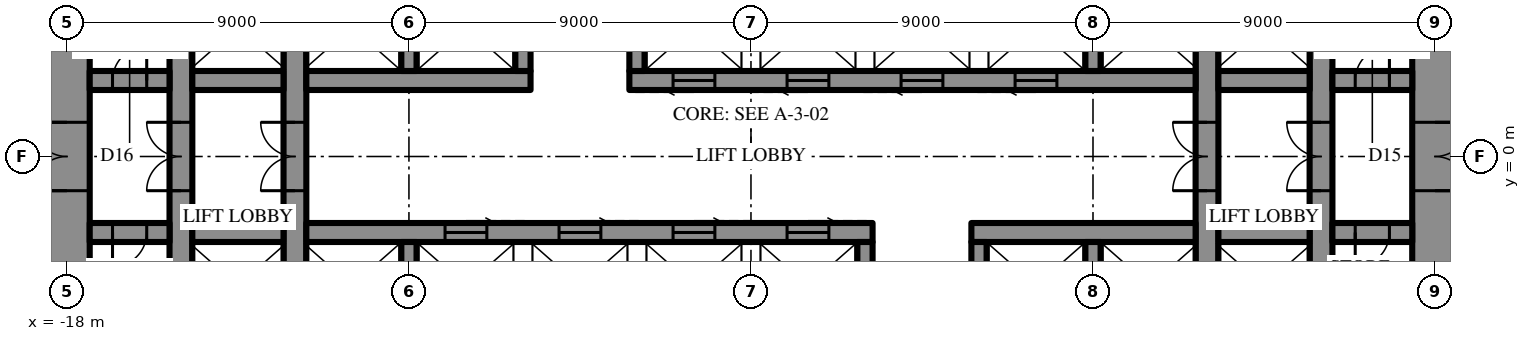
"""IFC4 building model, lengths in metres.
Left out: names, types, materials, properties, quantities, classifications, styles, units other than length and angle.
Written with IfcOpenShell. Run it as: python <this file> out.ifc"""

import sys

from ifc_helpers import new_model, si_unit, direction, frame, frame_2d, origin, place, context, subcontext, project, spatial, rectangle, extrude, element, fill, save


model = new_model("IFC4")
c1 = context("Model", 3, precision=1e-05, world=origin(), true_north=direction((0.0, 1.0)))
c2 = subcontext(c1, "Body", "Model", "MODEL_VIEW")
j1 = project(units=[si_unit("LENGTHUNIT", "METRE"), si_unit("PLANEANGLEUNIT", "RADIAN")], contexts=[c1])
p1 = place(None, origin())
s1 = spatial("IfcSite", under=j1, at=p1, CompositionType="ELEMENT")
p2 = place(p1, origin())
s2 = spatial("IfcBuilding", under=s1, at=p2, CompositionType="ELEMENT")
p3 = place(p2, frame((0.0, 0.0, 178.3)))
s3 = spatial("IfcBuildingStorey", under=s2, at=p3, CompositionType="ELEMENT", Elevation=178.3)
p4 = place(p3, frame((18.0, -10.7, 0.0), z_axis=(0.0, 0.0, 1.0), x_axis=(0.0, 1.0, 0.0)))
e1 = element("IfcWall", 1, at=p4, inside=s3, PredefinedType="SHEAR", context=c2, shape_type="SweptSolid", body=[
    extrude(rectangle(XDim=21.4, YDim=1.2, at=frame_2d((10.7, 0.0))), origin(), (0.0, 0.0, 1.0), 4.2),
])
p5 = place(p4, frame((9.8, 0.0, 0.0)))
e2 = element("IfcOpeningElement", 2, at=p5, cuts=e1, PredefinedType="OPENING", context=c2, shape_type="SweptSolid", body=[
    extrude(rectangle(XDim=1.8, YDim=2.4, at=frame_2d((0.9, 1.2))), frame((0.0, 0.61, 0.0), z_axis=(0.0, -1.0, 0.0), x_axis=(1.0, 0.0, 0.0)), (0.0, 0.0, 1.0), 1.22),
])
p6 = place(p3, frame((-18.0, 10.7, 0.0), z_axis=(0.0, 0.0, 1.0), x_axis=(0.0, -1.0, 0.0)))
e3 = element("IfcWall", 3, at=p6, inside=s3, PredefinedType="SHEAR", context=c2, shape_type="SweptSolid", body=[
    extrude(rectangle(XDim=21.4, YDim=1.2, at=frame_2d((10.7, 0.0))), origin(), (0.0, 0.0, 1.0), 4.2),
])
p7 = place(p6, frame((9.8, 0.0, 0.0)))
e4 = element("IfcOpeningElement", 4, at=p7, cuts=e3, PredefinedType="OPENING", context=c2, shape_type="SweptSolid", body=[
    extrude(rectangle(XDim=1.8, YDim=2.4, at=frame_2d((0.9, 1.2))), frame((0.0, 0.61, 0.0), z_axis=(0.0, -1.0, 0.0), x_axis=(1.0, 0.0, 0.0)), (0.0, 0.0, 1.0), 1.22),
])
p8 = place(p3, frame((12.0, -10.7, 0.0), z_axis=(0.0, 0.0, 1.0), x_axis=(0.0, 1.0, 0.0)))
e5 = element("IfcWall", 5, at=p8, inside=s3, PredefinedType="SHEAR", context=c2, shape_type="SweptSolid", body=[
    extrude(rectangle(XDim=21.4, YDim=0.6, at=frame_2d((10.7, 0.0))), origin(), (0.0, 0.0, 1.0), 4.2),
])
p9 = place(p8, frame((9.8, 0.0, 0.0)))
e6 = element("IfcOpeningElement", 6, at=p9, cuts=e5, PredefinedType="OPENING", context=c2, shape_type="SweptSolid", body=[
    extrude(rectangle(XDim=1.8, YDim=2.4, at=frame_2d((0.9, 1.2))), frame((0.0, 0.31, 0.0), z_axis=(0.0, -1.0, 0.0), x_axis=(1.0, 0.0, 0.0)), (0.0, 0.0, 1.0), 0.62),
])
p10 = place(p3, frame((-12.0, -10.7, 0.0), z_axis=(0.0, 0.0, 1.0), x_axis=(0.0, 1.0, 0.0)))
e7 = element("IfcWall", 7, at=p10, inside=s3, PredefinedType="SHEAR", context=c2, shape_type="SweptSolid", body=[
    extrude(rectangle(XDim=21.4, YDim=0.6, at=frame_2d((10.7, 0.0))), origin(), (0.0, 0.0, 1.0), 4.2),
])
p11 = place(p10, frame((9.8, 0.0, 0.0)))
e8 = element("IfcOpeningElement", 8, at=p11, cuts=e7, PredefinedType="OPENING", context=c2, shape_type="SweptSolid", body=[
    extrude(rectangle(XDim=1.8, YDim=2.4, at=frame_2d((0.9, 1.2))), frame((0.0, 0.31, 0.0), z_axis=(0.0, -1.0, 0.0), x_axis=(1.0, 0.0, 0.0)), (0.0, 0.0, 1.0), 0.62),
])
p12 = place(p3, frame((15.0, -10.7, 0.0), z_axis=(0.0, 0.0, 1.0), x_axis=(0.0, 1.0, 0.0)))
e9 = element("IfcWall", 9, at=p12, inside=s3, PredefinedType="SHEAR", context=c2, shape_type="SweptSolid", body=[
    extrude(rectangle(XDim=21.4, YDim=0.6, at=frame_2d((10.7, 0.0))), origin(), (0.0, 0.0, 1.0), 4.2),
])
p13 = place(p12, frame((9.8, 0.0, 0.0)))
e10 = element("IfcOpeningElement", 10, at=p13, cuts=e9, PredefinedType="OPENING", context=c2, shape_type="SweptSolid", body=[
    extrude(rectangle(XDim=1.8, YDim=2.4, at=frame_2d((0.9, 1.2))), frame((0.0, 0.31, 0.0), z_axis=(0.0, -1.0, 0.0), x_axis=(1.0, 0.0, 0.0)), (0.0, 0.0, 1.0), 0.62),
])
p14 = place(p3, frame((-15.0, -10.7, 0.0), z_axis=(0.0, 0.0, 1.0), x_axis=(0.0, 1.0, 0.0)))
e11 = element("IfcWall", 11, at=p14, inside=s3, PredefinedType="SHEAR", context=c2, shape_type="SweptSolid", body=[
    extrude(rectangle(XDim=21.4, YDim=0.6, at=frame_2d((10.7, 0.0))), origin(), (0.0, 0.0, 1.0), 4.2),
])
p15 = place(p14, frame((9.8, 0.0, 0.0)))
e12 = element("IfcOpeningElement", 12, at=p15, cuts=e11, PredefinedType="OPENING", context=c2, shape_type="SweptSolid", body=[
    extrude(rectangle(XDim=1.8, YDim=2.4, at=frame_2d((0.9, 1.2))), frame((0.0, 0.31, 0.0), z_axis=(0.0, -1.0, 0.0), x_axis=(1.0, 0.0, 0.0)), (0.0, 0.0, 1.0), 0.62),
])
p16 = place(p3, frame((-17.4, 2.0, 0.0), z_axis=(0.0, 0.0, 1.0), x_axis=(1.0, 0.0, 0.0)))
e13 = element("IfcWall", 13, at=p16, inside=s3, PredefinedType="SHEAR", context=c2, shape_type="SweptSolid", body=[
    extrude(rectangle(XDim=2.1, YDim=0.5, at=frame_2d((1.05, 0.0))), origin(), (0.0, 0.0, 1.0), 4.2),
])
p17 = place(p16, frame((0.6, 0.0, 0.0)))
e14 = element("IfcOpeningElement", 14, at=p17, cuts=e13, PredefinedType="OPENING", context=c2, shape_type="SweptSolid", body=[
    extrude(rectangle(XDim=0.9, YDim=2.2, at=frame_2d((0.45, 1.1))), frame((0.0, 0.26, 0.0), z_axis=(0.0, -1.0, 0.0), x_axis=(1.0, 0.0, 0.0)), (0.0, 0.0, 1.0), 0.52),
])
p18 = place(p3, frame((-14.7, 2.0, 0.0), z_axis=(0.0, 0.0, 1.0), x_axis=(1.0, 0.0, 0.0)))
e15 = element("IfcWall", 15, at=p18, inside=s3, PredefinedType="SHEAR", context=c2, shape_type="SweptSolid", body=[
    extrude(rectangle(XDim=2.4, YDim=0.5, at=frame_2d((1.2, 0.0))), origin(), (0.0, 0.0, 1.0), 4.2),
])
p19 = place(p3, frame((-11.7, 2.0, 0.0), z_axis=(0.0, 0.0, 1.0), x_axis=(1.0, 0.0, 0.0)))
e16 = element("IfcWall", 16, at=p19, inside=s3, PredefinedType="SHEAR", context=c2, shape_type="SweptSolid", body=[
    extrude(rectangle(XDim=5.9, YDim=0.5, at=frame_2d((2.95, 0.0))), origin(), (0.0, 0.0, 1.0), 4.2),
])
p20 = place(p3, frame((-3.2, 2.0, 0.0), z_axis=(0.0, 0.0, 1.0), x_axis=(1.0, 0.0, 0.0)))
e17 = element("IfcWall", 17, at=p20, inside=s3, PredefinedType="SHEAR", context=c2, shape_type="SweptSolid", body=[
    extrude(rectangle(XDim=14.9, YDim=0.5, at=frame_2d((7.45, 0.0))), origin(), (0.0, 0.0, 1.0), 4.2),
])
p21 = place(p20, frame((1.15, 0.0, 0.0)))
e18 = element("IfcOpeningElement", 18, at=p21, cuts=e17, PredefinedType="OPENING", context=c2, shape_type="SweptSolid", body=[
    extrude(rectangle(XDim=1.1, YDim=2.2, at=frame_2d((0.55, 1.1))), frame((0.0, 0.26, 0.0), z_axis=(0.0, -1.0, 0.0), x_axis=(1.0, 0.0, 0.0)), (0.0, 0.0, 1.0), 0.52),
])
p22 = place(p20, frame((4.15, 0.0, 0.0)))
e19 = element("IfcOpeningElement", 19, at=p22, cuts=e17, PredefinedType="OPENING", context=c2, shape_type="SweptSolid", body=[
    extrude(rectangle(XDim=1.1, YDim=2.2, at=frame_2d((0.55, 1.1))), frame((0.0, 0.26, 0.0), z_axis=(0.0, -1.0, 0.0), x_axis=(1.0, 0.0, 0.0)), (0.0, 0.0, 1.0), 0.52),
])
p23 = place(p20, frame((7.15, 0.0, 0.0)))
e20 = element("IfcOpeningElement", 20, at=p23, cuts=e17, PredefinedType="OPENING", context=c2, shape_type="SweptSolid", body=[
    extrude(rectangle(XDim=1.1, YDim=2.2, at=frame_2d((0.55, 1.1))), frame((0.0, 0.26, 0.0), z_axis=(0.0, -1.0, 0.0), x_axis=(1.0, 0.0, 0.0)), (0.0, 0.0, 1.0), 0.52),
])
p24 = place(p20, frame((10.15, 0.0, 0.0)))
e21 = element("IfcOpeningElement", 21, at=p24, cuts=e17, PredefinedType="OPENING", context=c2, shape_type="SweptSolid", body=[
    extrude(rectangle(XDim=1.1, YDim=2.2, at=frame_2d((0.55, 1.1))), frame((0.0, 0.26, 0.0), z_axis=(0.0, -1.0, 0.0), x_axis=(1.0, 0.0, 0.0)), (0.0, 0.0, 1.0), 0.52),
])
p25 = place(p3, frame((12.3, 2.0, 0.0), z_axis=(0.0, 0.0, 1.0), x_axis=(1.0, 0.0, 0.0)))
e22 = element("IfcWall", 22, at=p25, inside=s3, PredefinedType="SHEAR", context=c2, shape_type="SweptSolid", body=[
    extrude(rectangle(XDim=2.4, YDim=0.5, at=frame_2d((1.2, 0.0))), origin(), (0.0, 0.0, 1.0), 4.2),
])
p26 = place(p3, frame((15.3, 2.0, 0.0), z_axis=(0.0, 0.0, 1.0), x_axis=(1.0, 0.0, 0.0)))
e23 = element("IfcWall", 23, at=p26, inside=s3, PredefinedType="SHEAR", context=c2, shape_type="SweptSolid", body=[
    extrude(rectangle(XDim=2.1, YDim=0.5, at=frame_2d((1.05, 0.0))), origin(), (0.0, 0.0, 1.0), 4.2),
])
p27 = place(p26, frame((0.6, 0.0, 0.0)))
e24 = element("IfcOpeningElement", 24, at=p27, cuts=e23, PredefinedType="OPENING", context=c2, shape_type="SweptSolid", body=[
    extrude(rectangle(XDim=0.9, YDim=2.2, at=frame_2d((0.45, 1.1))), frame((0.0, 0.26, 0.0), z_axis=(0.0, -1.0, 0.0), x_axis=(1.0, 0.0, 0.0)), (0.0, 0.0, 1.0), 0.52),
])
for number, where, z_axis, x_axis in (
    (25, (-9.0, 2.25, 0.0), (0.0, 0.0, 1.0), (0.0, 1.0, 0.0)),
    (26, (-6.0, 2.25, 0.0), (0.0, 0.0, 1.0), (0.0, 1.0, 0.0)),
    (27, (-3.0, 2.25, 0.0), (0.0, 0.0, 1.0), (0.0, 1.0, 0.0)),
    (28, (9.0, 2.25, 0.0), (0.0, 0.0, 1.0), (0.0, 1.0, 0.0)),
):
    element("IfcWall", number, at=place(p3, frame(where, z_axis=z_axis, x_axis=x_axis)), inside=s3, PredefinedType="SHEAR", context=c2, shape_type="SweptSolid", body=[
        extrude(rectangle(XDim=2.3, YDim=0.4, at=frame_2d((1.15, 0.0))), origin(), (0.0, 0.0, 1.0), 4.2),
    ])
p28 = place(p3, frame((17.4, -2.0, 0.0), z_axis=(0.0, 0.0, 1.0), x_axis=(-1.0, 0.0, 0.0)))
e29 = element("IfcWall", 29, at=p28, inside=s3, PredefinedType="SHEAR", context=c2, shape_type="SweptSolid", body=[
    extrude(rectangle(XDim=2.1, YDim=0.5, at=frame_2d((1.05, 0.0))), origin(), (0.0, 0.0, 1.0), 4.2),
])
p29 = place(p28, frame((0.6, 0.0, 0.0)))
e30 = element("IfcOpeningElement", 30, at=p29, cuts=e29, PredefinedType="OPENING", context=c2, shape_type="SweptSolid", body=[
    extrude(rectangle(XDim=0.9, YDim=2.2, at=frame_2d((0.45, 1.1))), frame((0.0, 0.26, 0.0), z_axis=(0.0, -1.0, 0.0), x_axis=(1.0, 0.0, 0.0)), (0.0, 0.0, 1.0), 0.52),
])
p30 = place(p3, frame((14.7, -2.0, 0.0), z_axis=(0.0, 0.0, 1.0), x_axis=(-1.0, 0.0, 0.0)))
e31 = element("IfcWall", 31, at=p30, inside=s3, PredefinedType="SHEAR", context=c2, shape_type="SweptSolid", body=[
    extrude(rectangle(XDim=2.4, YDim=0.5, at=frame_2d((1.2, 0.0))), origin(), (0.0, 0.0, 1.0), 4.2),
])
p31 = place(p3, frame((11.7, -2.0, 0.0), z_axis=(0.0, 0.0, 1.0), x_axis=(-1.0, 0.0, 0.0)))
e32 = element("IfcWall", 32, at=p31, inside=s3, PredefinedType="SHEAR", context=c2, shape_type="SweptSolid", body=[
    extrude(rectangle(XDim=5.9, YDim=0.5, at=frame_2d((2.95, 0.0))), origin(), (0.0, 0.0, 1.0), 4.2),
])
p32 = place(p3, frame((3.2, -2.0, 0.0), z_axis=(0.0, 0.0, 1.0), x_axis=(-1.0, 0.0, 0.0)))
e33 = element("IfcWall", 33, at=p32, inside=s3, PredefinedType="SHEAR", context=c2, shape_type="SweptSolid", body=[
    extrude(rectangle(XDim=14.9, YDim=0.5, at=frame_2d((7.45, 0.0))), origin(), (0.0, 0.0, 1.0), 4.2),
])
p33 = place(p32, frame((1.15, 0.0, 0.0)))
e34 = element("IfcOpeningElement", 34, at=p33, cuts=e33, PredefinedType="OPENING", context=c2, shape_type="SweptSolid", body=[
    extrude(rectangle(XDim=1.1, YDim=2.2, at=frame_2d((0.55, 1.1))), frame((0.0, 0.26, 0.0), z_axis=(0.0, -1.0, 0.0), x_axis=(1.0, 0.0, 0.0)), (0.0, 0.0, 1.0), 0.52),
])
p34 = place(p32, frame((4.15, 0.0, 0.0)))
e35 = element("IfcOpeningElement", 35, at=p34, cuts=e33, PredefinedType="OPENING", context=c2, shape_type="SweptSolid", body=[
    extrude(rectangle(XDim=1.1, YDim=2.2, at=frame_2d((0.55, 1.1))), frame((0.0, 0.26, 0.0), z_axis=(0.0, -1.0, 0.0), x_axis=(1.0, 0.0, 0.0)), (0.0, 0.0, 1.0), 0.52),
])
p35 = place(p32, frame((7.15, 0.0, 0.0)))
e36 = element("IfcOpeningElement", 36, at=p35, cuts=e33, PredefinedType="OPENING", context=c2, shape_type="SweptSolid", body=[
    extrude(rectangle(XDim=1.1, YDim=2.2, at=frame_2d((0.55, 1.1))), frame((0.0, 0.26, 0.0), z_axis=(0.0, -1.0, 0.0), x_axis=(1.0, 0.0, 0.0)), (0.0, 0.0, 1.0), 0.52),
])
p36 = place(p32, frame((10.15, 0.0, 0.0)))
e37 = element("IfcOpeningElement", 37, at=p36, cuts=e33, PredefinedType="OPENING", context=c2, shape_type="SweptSolid", body=[
    extrude(rectangle(XDim=1.1, YDim=2.2, at=frame_2d((0.55, 1.1))), frame((0.0, 0.26, 0.0), z_axis=(0.0, -1.0, 0.0), x_axis=(1.0, 0.0, 0.0)), (0.0, 0.0, 1.0), 0.52),
])
p37 = place(p3, frame((-12.3, -2.0, 0.0), z_axis=(0.0, 0.0, 1.0), x_axis=(-1.0, 0.0, 0.0)))
e38 = element("IfcWall", 38, at=p37, inside=s3, PredefinedType="SHEAR", context=c2, shape_type="SweptSolid", body=[
    extrude(rectangle(XDim=2.4, YDim=0.5, at=frame_2d((1.2, 0.0))), origin(), (0.0, 0.0, 1.0), 4.2),
])
p38 = place(p3, frame((-15.3, -2.0, 0.0), z_axis=(0.0, 0.0, 1.0), x_axis=(-1.0, 0.0, 0.0)))
e39 = element("IfcWall", 39, at=p38, inside=s3, PredefinedType="SHEAR", context=c2, shape_type="SweptSolid", body=[
    extrude(rectangle(XDim=2.1, YDim=0.5, at=frame_2d((1.05, 0.0))), origin(), (0.0, 0.0, 1.0), 4.2),
])
p39 = place(p38, frame((0.6, 0.0, 0.0)))
e40 = element("IfcOpeningElement", 40, at=p39, cuts=e39, PredefinedType="OPENING", context=c2, shape_type="SweptSolid", body=[
    extrude(rectangle(XDim=0.9, YDim=2.2, at=frame_2d((0.45, 1.1))), frame((0.0, 0.26, 0.0), z_axis=(0.0, -1.0, 0.0), x_axis=(1.0, 0.0, 0.0)), (0.0, 0.0, 1.0), 0.52),
])
for number, where, z_axis, x_axis in (
    (41, (9.0, -2.25, 0.0), (0.0, 0.0, 1.0), (0.0, -1.0, 0.0)),
    (42, (6.0, -2.25, 0.0), (0.0, 0.0, 1.0), (0.0, -1.0, 0.0)),
    (43, (3.0, -2.25, 0.0), (0.0, 0.0, 1.0), (0.0, -1.0, 0.0)),
    (44, (-9.0, -2.25, 0.0), (0.0, 0.0, 1.0), (0.0, -1.0, 0.0)),
):
    element("IfcWall", number, at=place(p3, frame(where, z_axis=z_axis, x_axis=x_axis)), inside=s3, PredefinedType="SHEAR", context=c2, shape_type="SweptSolid", body=[
        extrude(rectangle(XDim=2.3, YDim=0.4, at=frame_2d((1.15, 0.0))), origin(), (0.0, 0.0, 1.0), 4.2),
    ])
p40 = place(p5, frame((1.8, 0.0, 0.0), z_axis=(0.0, 0.0, 1.0), x_axis=(-1.0, 0.0, 0.0)))
e45 = element("IfcDoor", 45, at=p40, inside=s3, OperationType="DOUBLE_DOOR_SINGLE_SWING", PredefinedType="DOOR", context=c2, shape_type="SweptSolid", body=[
    extrude(rectangle(XDim=1.8, YDim=2.4, at=frame_2d((0.9, 1.2))), frame((0.0, 0.025, 0.0), z_axis=(0.0, -1.0, 0.0), x_axis=(1.0, 0.0, 0.0)), (0.0, 0.0, 1.0), 0.05),
])
fill(e2, e45)
p41 = place(p7, frame((1.8, 0.0, 0.0), z_axis=(0.0, 0.0, 1.0), x_axis=(-1.0, 0.0, 0.0)))
e46 = element("IfcDoor", 46, at=p41, inside=s3, OperationType="DOUBLE_DOOR_SINGLE_SWING", PredefinedType="DOOR", context=c2, shape_type="SweptSolid", body=[
    extrude(rectangle(XDim=1.8, YDim=2.4, at=frame_2d((0.9, 1.2))), frame((0.0, 0.025, 0.0), z_axis=(0.0, -1.0, 0.0), x_axis=(1.0, 0.0, 0.0)), (0.0, 0.0, 1.0), 0.05),
])
fill(e4, e46)
p42 = place(p17, origin())
e47 = element("IfcDoor", 47, at=p42, inside=s3, OperationType="SINGLE_SWING_LEFT", PredefinedType="DOOR", context=c2, shape_type="SweptSolid", body=[
    extrude(rectangle(XDim=0.9, YDim=2.2, at=frame_2d((0.45, 1.1))), frame((0.0, 0.025, 0.0), z_axis=(0.0, -1.0, 0.0), x_axis=(1.0, 0.0, 0.0)), (0.0, 0.0, 1.0), 0.05),
])
fill(e14, e47)
p43 = place(p27, origin())
e48 = element("IfcDoor", 48, at=p43, inside=s3, OperationType="SINGLE_SWING_LEFT", PredefinedType="DOOR", context=c2, shape_type="SweptSolid", body=[
    extrude(rectangle(XDim=0.9, YDim=2.2, at=frame_2d((0.45, 1.1))), frame((0.0, 0.025, 0.0), z_axis=(0.0, -1.0, 0.0), x_axis=(1.0, 0.0, 0.0)), (0.0, 0.0, 1.0), 0.05),
])
fill(e24, e48)
p44 = place(p29, origin())
e49 = element("IfcDoor", 49, at=p44, inside=s3, OperationType="SINGLE_SWING_LEFT", PredefinedType="DOOR", context=c2, shape_type="SweptSolid", body=[
    extrude(rectangle(XDim=0.9, YDim=2.2, at=frame_2d((0.45, 1.1))), frame((0.0, 0.025, 0.0), z_axis=(0.0, -1.0, 0.0), x_axis=(1.0, 0.0, 0.0)), (0.0, 0.0, 1.0), 0.05),
])
fill(e30, e49)
p45 = place(p39, origin())
e50 = element("IfcDoor", 50, at=p45, inside=s3, OperationType="SINGLE_SWING_LEFT", PredefinedType="DOOR", context=c2, shape_type="SweptSolid", body=[
    extrude(rectangle(XDim=0.9, YDim=2.2, at=frame_2d((0.45, 1.1))), frame((0.0, 0.025, 0.0), z_axis=(0.0, -1.0, 0.0), x_axis=(1.0, 0.0, 0.0)), (0.0, 0.0, 1.0), 0.05),
])
fill(e40, e50)
p46 = place(p9, origin())
e51 = element("IfcDoor", 51, at=p46, inside=s3, OperationType="DOUBLE_DOOR_SINGLE_SWING", PredefinedType="DOOR", context=c2, shape_type="SweptSolid", body=[
    extrude(rectangle(XDim=1.8, YDim=2.4, at=frame_2d((0.9, 1.2))), frame((0.0, 0.025, 0.0), z_axis=(0.0, -1.0, 0.0), x_axis=(1.0, 0.0, 0.0)), (0.0, 0.0, 1.0), 0.05),
])
fill(e6, e51)
p47 = place(p11, origin())
e52 = element("IfcDoor", 52, at=p47, inside=s3, OperationType="DOUBLE_DOOR_SINGLE_SWING", PredefinedType="DOOR", context=c2, shape_type="SweptSolid", body=[
    extrude(rectangle(XDim=1.8, YDim=2.4, at=frame_2d((0.9, 1.2))), frame((0.0, 0.025, 0.0), z_axis=(0.0, -1.0, 0.0), x_axis=(1.0, 0.0, 0.0)), (0.0, 0.0, 1.0), 0.05),
])
fill(e8, e52)
p48 = place(p13, origin())
e53 = element("IfcDoor", 53, at=p48, inside=s3, OperationType="DOUBLE_DOOR_SINGLE_SWING", PredefinedType="DOOR", context=c2, shape_type="SweptSolid", body=[
    extrude(rectangle(XDim=1.8, YDim=2.4, at=frame_2d((0.9, 1.2))), frame((0.0, 0.025, 0.0), z_axis=(0.0, -1.0, 0.0), x_axis=(1.0, 0.0, 0.0)), (0.0, 0.0, 1.0), 0.05),
])
fill(e10, e53)
p49 = place(p15, origin())
e54 = element("IfcDoor", 54, at=p49, inside=s3, OperationType="DOUBLE_DOOR_SINGLE_SWING", PredefinedType="DOOR", context=c2, shape_type="SweptSolid", body=[
    extrude(rectangle(XDim=1.8, YDim=2.4, at=frame_2d((0.9, 1.2))), frame((0.0, 0.025, 0.0), z_axis=(0.0, -1.0, 0.0), x_axis=(1.0, 0.0, 0.0)), (0.0, 0.0, 1.0), 0.05),
])
fill(e12, e54)
p50 = place(p21, frame((1.1, 0.0, 0.0), z_axis=(0.0, 0.0, 1.0), x_axis=(-1.0, 0.0, 0.0)))
e55 = element("IfcDoor", 55, at=p50, inside=s3, OperationType="SLIDING_TO_LEFT", PredefinedType="DOOR", context=c2, shape_type="SweptSolid", body=[
    extrude(rectangle(XDim=1.1, YDim=2.2, at=frame_2d((0.55, 1.1))), frame((0.0, 0.025, 0.0), z_axis=(0.0, -1.0, 0.0), x_axis=(1.0, 0.0, 0.0)), (0.0, 0.0, 1.0), 0.05),
])
fill(e18, e55)
p51 = place(p22, frame((1.1, 0.0, 0.0), z_axis=(0.0, 0.0, 1.0), x_axis=(-1.0, 0.0, 0.0)))
e56 = element("IfcDoor", 56, at=p51, inside=s3, OperationType="SLIDING_TO_LEFT", PredefinedType="DOOR", context=c2, shape_type="SweptSolid", body=[
    extrude(rectangle(XDim=1.1, YDim=2.2, at=frame_2d((0.55, 1.1))), frame((0.0, 0.025, 0.0), z_axis=(0.0, -1.0, 0.0), x_axis=(1.0, 0.0, 0.0)), (0.0, 0.0, 1.0), 0.05),
])
fill(e19, e56)
p52 = place(p23, frame((1.1, 0.0, 0.0), z_axis=(0.0, 0.0, 1.0), x_axis=(-1.0, 0.0, 0.0)))
e57 = element("IfcDoor", 57, at=p52, inside=s3, OperationType="SLIDING_TO_LEFT", PredefinedType="DOOR", context=c2, shape_type="SweptSolid", body=[
    extrude(rectangle(XDim=1.1, YDim=2.2, at=frame_2d((0.55, 1.1))), frame((0.0, 0.025, 0.0), z_axis=(0.0, -1.0, 0.0), x_axis=(1.0, 0.0, 0.0)), (0.0, 0.0, 1.0), 0.05),
])
fill(e20, e57)
p53 = place(p24, frame((1.1, 0.0, 0.0), z_axis=(0.0, 0.0, 1.0), x_axis=(-1.0, 0.0, 0.0)))
e58 = element("IfcDoor", 58, at=p53, inside=s3, OperationType="SLIDING_TO_LEFT", PredefinedType="DOOR", context=c2, shape_type="SweptSolid", body=[
    extrude(rectangle(XDim=1.1, YDim=2.2, at=frame_2d((0.55, 1.1))), frame((0.0, 0.025, 0.0), z_axis=(0.0, -1.0, 0.0), x_axis=(1.0, 0.0, 0.0)), (0.0, 0.0, 1.0), 0.05),
])
fill(e21, e58)
p54 = place(p33, frame((1.1, 0.0, 0.0), z_axis=(0.0, 0.0, 1.0), x_axis=(-1.0, 0.0, 0.0)))
e59 = element("IfcDoor", 59, at=p54, inside=s3, OperationType="SLIDING_TO_LEFT", PredefinedType="DOOR", context=c2, shape_type="SweptSolid", body=[
    extrude(rectangle(XDim=1.1, YDim=2.2, at=frame_2d((0.55, 1.1))), frame((0.0, 0.025, 0.0), z_axis=(0.0, -1.0, 0.0), x_axis=(1.0, 0.0, 0.0)), (0.0, 0.0, 1.0), 0.05),
])
fill(e34, e59)
p55 = place(p34, frame((1.1, 0.0, 0.0), z_axis=(0.0, 0.0, 1.0), x_axis=(-1.0, 0.0, 0.0)))
e60 = element("IfcDoor", 60, at=p55, inside=s3, OperationType="SLIDING_TO_LEFT", PredefinedType="DOOR", context=c2, shape_type="SweptSolid", body=[
    extrude(rectangle(XDim=1.1, YDim=2.2, at=frame_2d((0.55, 1.1))), frame((0.0, 0.025, 0.0), z_axis=(0.0, -1.0, 0.0), x_axis=(1.0, 0.0, 0.0)), (0.0, 0.0, 1.0), 0.05),
])
fill(e35, e60)
p56 = place(p35, frame((1.1, 0.0, 0.0), z_axis=(0.0, 0.0, 1.0), x_axis=(-1.0, 0.0, 0.0)))
e61 = element("IfcDoor", 61, at=p56, inside=s3, OperationType="SLIDING_TO_LEFT", PredefinedType="DOOR", context=c2, shape_type="SweptSolid", body=[
    extrude(rectangle(XDim=1.1, YDim=2.2, at=frame_2d((0.55, 1.1))), frame((0.0, 0.025, 0.0), z_axis=(0.0, -1.0, 0.0), x_axis=(1.0, 0.0, 0.0)), (0.0, 0.0, 1.0), 0.05),
])
fill(e36, e61)
p57 = place(p36, frame((1.1, 0.0, 0.0), z_axis=(0.0, 0.0, 1.0), x_axis=(-1.0, 0.0, 0.0)))
e62 = element("IfcDoor", 62, at=p57, inside=s3, OperationType="SLIDING_TO_LEFT", PredefinedType="DOOR", context=c2, shape_type="SweptSolid", body=[
    extrude(rectangle(XDim=1.1, YDim=2.2, at=frame_2d((0.55, 1.1))), frame((0.0, 0.025, 0.0), z_axis=(0.0, -1.0, 0.0), x_axis=(1.0, 0.0, 0.0)), (0.0, 0.0, 1.0), 0.05),
])
fill(e37, e62)
save(model, sys.argv[1])
